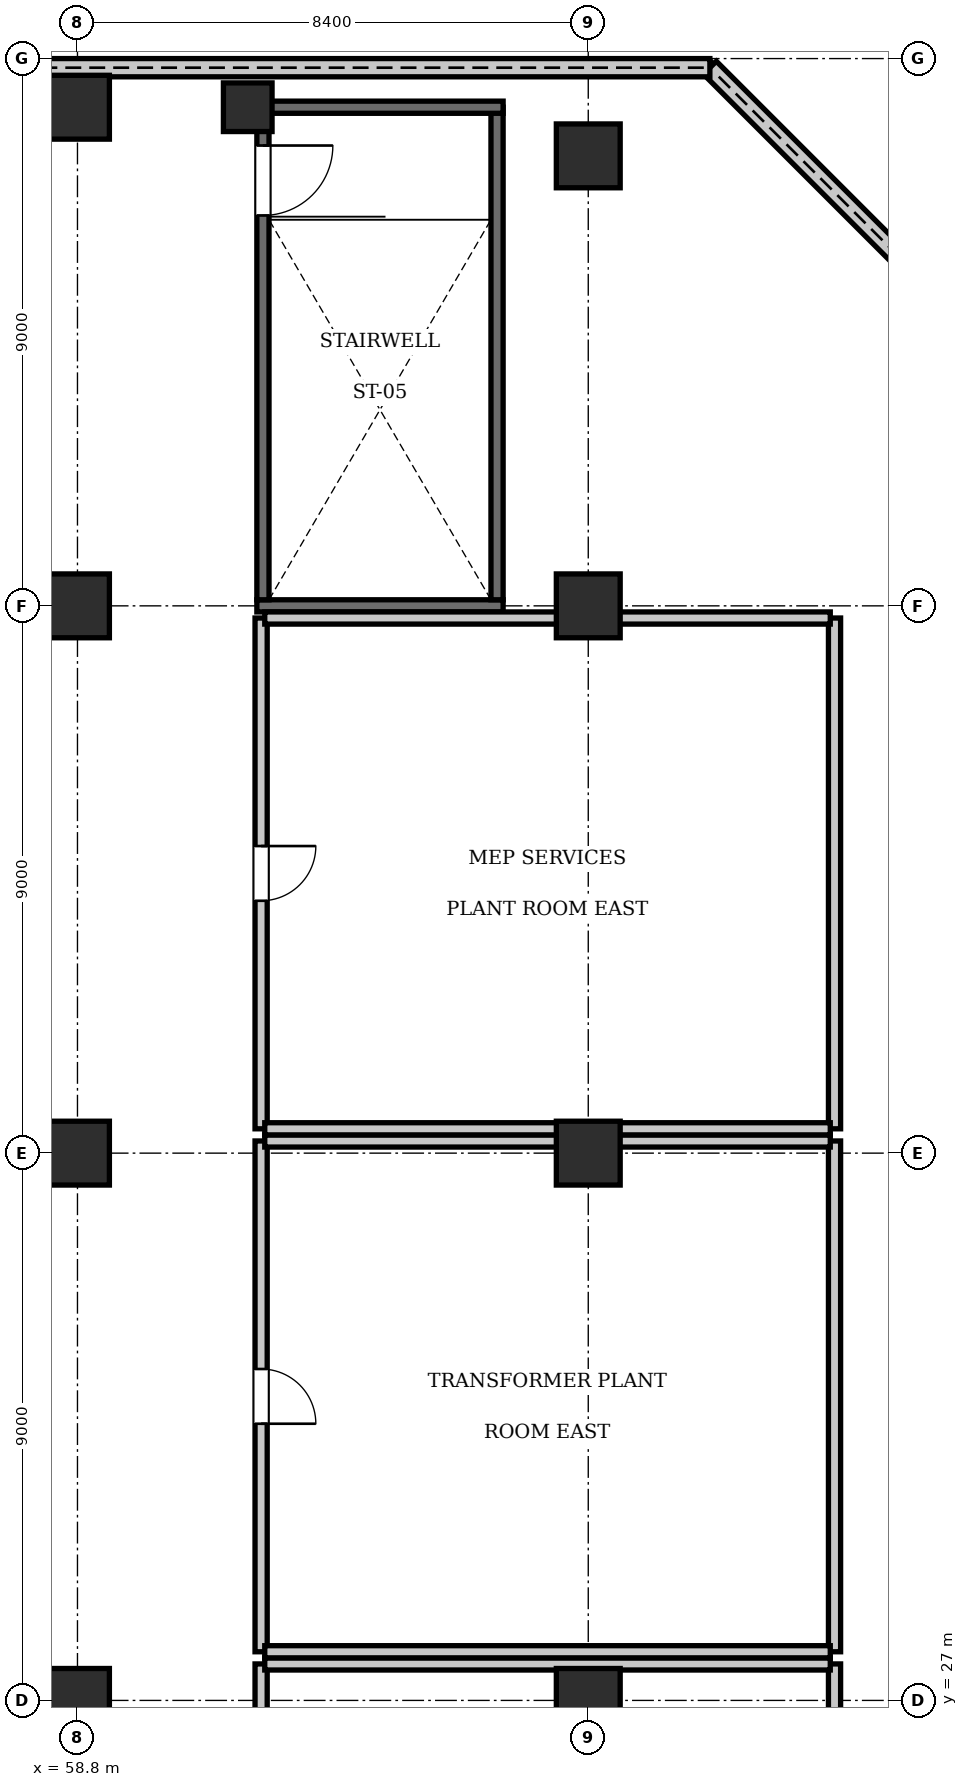
"""IFC4 building model, lengths in metres.
Left out: names, types, materials, properties, quantities, classifications, styles, units other than length and angle.
Written with IfcOpenShell. Run it as: python <this file> out.ifc"""

import sys

from ifc_helpers import new_model, si_unit, direction, frame, frame_2d, origin, origin_2d, place, context, subcontext, project, spatial, rectangle, extrude, element, fill, save


model = new_model("IFC4")
c1 = context("Model", 3, precision=1e-05, world=origin(), true_north=direction((0.0, 1.0)))
c2 = subcontext(c1, "Body", "Model", "MODEL_VIEW")
j1 = project(units=[si_unit("LENGTHUNIT", "METRE"), si_unit("PLANEANGLEUNIT", "RADIAN")], contexts=[c1])
p1 = place(None, origin())
s1 = spatial("IfcSite", under=j1, at=p1, CompositionType="ELEMENT")
p2 = place(p1, origin())
s2 = spatial("IfcBuilding", under=s1, at=p2, CompositionType="ELEMENT")
p3 = place(p2, frame((0.0, 0.0, 21.35)))
s3 = spatial("IfcBuildingStorey", under=s2, at=p3, CompositionType="ELEMENT", Elevation=21.35)
for number, where, z_axis, x_axis in (
    (1, (58.8, 27.0, 0.0), (0.0, 0.0, 1.0), (1.0, 0.0, 0.0)),
    (2, (58.8, 36.0, 0.0), (0.0, 0.0, 1.0), (1.0, 0.0, 0.0)),
    (3, (58.8, 45.0, 0.0), (0.0, 0.0, 1.0), (1.0, 0.0, 0.0)),
    (4, (67.2, 27.0, 0.0), (0.0, 0.0, 1.0), (1.0, 0.0, 0.0)),
    (5, (67.2, 36.0, 0.0), (0.0, 0.0, 1.0), (1.0, 0.0, 0.0)),
    (6, (67.2, 45.0, 0.0), (0.0, 0.0, 1.0), (1.0, 0.0, 0.0)),
    (7, (67.2, 52.4, 0.0), (0.0, 0.0, 1.0), (1.0, 0.0, 0.0)),
    (8, (58.8, 53.2, 0.0), (0.0, 0.0, 1.0), (1.0, 0.0, 0.0)),
):
    element("IfcColumn", number, at=place(p3, frame(where, z_axis=z_axis, x_axis=x_axis)), inside=s3, PredefinedType="COLUMN", context=c2, shape_type="SweptSolid", body=[
        extrude(rectangle(XDim=1.05, YDim=1.05, at=origin_2d()), origin(), (0.0, 0.0, 1.0), 5.6),
    ])
p4 = place(p3, frame((61.6, 53.2, 0.0), z_axis=(0.0, 0.0, 1.0), x_axis=(1.0, 0.0, 0.0)))
e9 = element("IfcColumn", 9, at=p4, inside=s3, PredefinedType="PILASTER", context=c2, shape_type="SweptSolid", body=[
    extrude(rectangle(XDim=0.8, YDim=0.8, at=origin_2d()), origin(), (0.0, 0.0, 1.0), 5.6),
])
p5 = place(p3, frame((61.75, 45.0, 0.0), z_axis=(0.0, 0.0, 1.0), x_axis=(1.0, 0.0, 0.0)))
e10 = element("IfcWall", 10, at=p5, inside=s3, PredefinedType="SOLIDWALL", context=c2, shape_type="SweptSolid", body=[
    extrude(rectangle(XDim=4.05, YDim=0.2, at=frame_2d((2.025, 0.0))), origin(), (0.0, 0.0, 1.0), 3.76),
])
p6 = place(p3, frame((61.85, 45.1, 0.0), z_axis=(0.0, 0.0, 1.0), x_axis=(0.0, 1.0, 0.0)))
e11 = element("IfcWall", 11, at=p6, inside=s3, PredefinedType="SOLIDWALL", context=c2, shape_type="SweptSolid", body=[
    extrude(rectangle(XDim=8.1, YDim=0.2, at=frame_2d((4.05, 0.0))), origin(), (0.0, 0.0, 1.0), 5.36),
])
p7 = place(p6, frame((6.32, 0.0, 0.0)))
e12 = element("IfcOpeningElement", 12, at=p7, cuts=e11, PredefinedType="OPENING", context=c2, shape_type="SweptSolid", body=[
    extrude(rectangle(XDim=1.15, YDim=2.15, at=frame_2d((0.575, 1.075))), frame((0.0, 0.11, 0.0), z_axis=(0.0, -1.0, 0.0), x_axis=(1.0, 0.0, 0.0)), (0.0, 0.0, 1.0), 0.22),
])
p8 = place(p3, frame((65.7, 45.1, 0.0), z_axis=(0.0, 0.0, 1.0), x_axis=(0.0, 1.0, 0.0)))
e13 = element("IfcWall", 13, at=p8, inside=s3, PredefinedType="SOLIDWALL", context=c2, shape_type="SweptSolid", body=[
    extrude(rectangle(XDim=8.1, YDim=0.2, at=frame_2d((4.05, 0.0))), origin(), (0.0, 0.0, 1.0), 5.36),
])
p9 = place(p3, frame((61.75, 53.2, 0.0), z_axis=(0.0, 0.0, 1.0), x_axis=(1.0, 0.0, 0.0)))
e14 = element("IfcWall", 14, at=p9, inside=s3, PredefinedType="SOLIDWALL", context=c2, shape_type="SweptSolid", body=[
    extrude(rectangle(XDim=4.05, YDim=0.2, at=frame_2d((2.025, 0.0))), origin(), (0.0, 0.0, 1.0), 5.36),
])
p10 = place(p3, frame((75.45, 47.6, 0.0), z_axis=(0.0, 0.0, 1.0), x_axis=(-0.707106781187, 0.707106781187, 0.0)))
e15 = element("IfcWall", 15, at=p10, inside=s3, PredefinedType="SOLIDWALL", context=c2, shape_type="SweptSolid", body=[
    extrude(rectangle(XDim=8.839, YDim=0.3, at=frame_2d((4.419, 0.0))), origin(), (0.0, 0.0, 1.0), 1.8),
])
p11 = place(p3, frame((69.2, 53.85, 0.0), z_axis=(0.0, 0.0, 1.0), x_axis=(-1.0, 0.0, 0.0)))
e16 = element("IfcWall", 16, at=p11, inside=s3, PredefinedType="SOLIDWALL", context=c2, shape_type="SweptSolid", body=[
    extrude(rectangle(XDim=18.8, YDim=0.3, at=frame_2d((9.4, 0.0))), origin(), (0.0, 0.0, 1.0), 1.8),
])
p12 = place(p3, frame((61.82, 19.2, 0.0), z_axis=(0.0, 0.0, 1.0), x_axis=(0.0, 1.0, 0.0)))
e17 = element("IfcWall", 17, at=p12, inside=s3, PredefinedType="PARTITIONING", context=c2, shape_type="SweptSolid", body=[
    extrude(rectangle(XDim=8.4, YDim=0.2, at=frame_2d((4.2, 0.0))), origin(), (0.0, 0.0, 1.0), 5.36),
])
p13 = place(p12, frame((3.75, 0.0, 0.0)))
e18 = element("IfcOpeningElement", 18, at=p13, cuts=e17, PredefinedType="OPENING", context=c2, shape_type="SweptSolid", body=[
    extrude(rectangle(XDim=0.9, YDim=2.1, at=frame_2d((0.45, 1.05))), frame((0.0, 0.11, 0.0), z_axis=(0.0, -1.0, 0.0), x_axis=(1.0, 0.0, 0.0)), (0.0, 0.0, 1.0), 0.22),
])
p14 = place(p3, frame((71.25, 19.2, 0.0), z_axis=(0.0, 0.0, 1.0), x_axis=(0.0, 1.0, 0.0)))
e19 = element("IfcWall", 19, at=p14, inside=s3, PredefinedType="PARTITIONING", context=c2, shape_type="SweptSolid", body=[
    extrude(rectangle(XDim=8.4, YDim=0.2, at=frame_2d((4.2, 0.0))), origin(), (0.0, 0.0, 1.0), 5.36),
])
p15 = place(p3, frame((61.88, 27.6, 0.0), z_axis=(0.0, 0.0, 1.0), x_axis=(1.0, 0.0, 0.0)))
e20 = element("IfcWall", 20, at=p15, inside=s3, PredefinedType="PARTITIONING", context=c2, shape_type="SweptSolid", body=[
    extrude(rectangle(XDim=9.3, YDim=0.2, at=frame_2d((4.65, 0.0))), origin(), (0.0, 0.0, 1.0), 5.36),
])
p16 = place(p3, frame((61.82, 27.8, 0.0), z_axis=(0.0, 0.0, 1.0), x_axis=(0.0, 1.0, 0.0)))
e21 = element("IfcWall", 21, at=p16, inside=s3, PredefinedType="PARTITIONING", context=c2, shape_type="SweptSolid", body=[
    extrude(rectangle(XDim=8.4, YDim=0.2, at=frame_2d((4.2, 0.0))), origin(), (0.0, 0.0, 1.0), 5.36),
])
p17 = place(p16, frame((3.75, 0.0, 0.0)))
e22 = element("IfcOpeningElement", 22, at=p17, cuts=e21, PredefinedType="OPENING", context=c2, shape_type="SweptSolid", body=[
    extrude(rectangle(XDim=0.9, YDim=2.1, at=frame_2d((0.45, 1.05))), frame((0.0, 0.11, 0.0), z_axis=(0.0, -1.0, 0.0), x_axis=(1.0, 0.0, 0.0)), (0.0, 0.0, 1.0), 0.22),
])
p18 = place(p3, frame((71.25, 27.8, 0.0), z_axis=(0.0, 0.0, 1.0), x_axis=(0.0, 1.0, 0.0)))
e23 = element("IfcWall", 23, at=p18, inside=s3, PredefinedType="PARTITIONING", context=c2, shape_type="SweptSolid", body=[
    extrude(rectangle(XDim=8.4, YDim=0.2, at=frame_2d((4.2, 0.0))), origin(), (0.0, 0.0, 1.0), 5.36),
])
p19 = place(p3, frame((61.88, 27.8, 0.0), z_axis=(0.0, 0.0, 1.0), x_axis=(1.0, 0.0, 0.0)))
e24 = element("IfcWall", 24, at=p19, inside=s3, PredefinedType="PARTITIONING", context=c2, shape_type="SweptSolid", body=[
    extrude(rectangle(XDim=9.3, YDim=0.2, at=frame_2d((4.65, 0.0))), origin(), (0.0, 0.0, 1.0), 5.36),
])
p20 = place(p3, frame((61.88, 36.2, 0.0), z_axis=(0.0, 0.0, 1.0), x_axis=(1.0, 0.0, 0.0)))
e25 = element("IfcWall", 25, at=p20, inside=s3, PredefinedType="PARTITIONING", context=c2, shape_type="SweptSolid", body=[
    extrude(rectangle(XDim=9.3, YDim=0.2, at=frame_2d((4.65, 0.0))), origin(), (0.0, 0.0, 1.0), 3.76),
])
p21 = place(p3, frame((61.82, 36.4, 0.0), z_axis=(0.0, 0.0, 1.0), x_axis=(0.0, 1.0, 0.0)))
e26 = element("IfcWall", 26, at=p21, inside=s3, PredefinedType="PARTITIONING", context=c2, shape_type="SweptSolid", body=[
    extrude(rectangle(XDim=8.4, YDim=0.2, at=frame_2d((4.2, 0.0))), origin(), (0.0, 0.0, 1.0), 5.36),
])
p22 = place(p21, frame((3.75, 0.0, 0.0)))
e27 = element("IfcOpeningElement", 27, at=p22, cuts=e26, PredefinedType="OPENING", context=c2, shape_type="SweptSolid", body=[
    extrude(rectangle(XDim=0.9, YDim=2.1, at=frame_2d((0.45, 1.05))), frame((0.0, 0.11, 0.0), z_axis=(0.0, -1.0, 0.0), x_axis=(1.0, 0.0, 0.0)), (0.0, 0.0, 1.0), 0.22),
])
p23 = place(p3, frame((71.25, 36.4, 0.0), z_axis=(0.0, 0.0, 1.0), x_axis=(0.0, 1.0, 0.0)))
e28 = element("IfcWall", 28, at=p23, inside=s3, PredefinedType="PARTITIONING", context=c2, shape_type="SweptSolid", body=[
    extrude(rectangle(XDim=8.4, YDim=0.2, at=frame_2d((4.2, 0.0))), origin(), (0.0, 0.0, 1.0), 5.36),
])
p24 = place(p3, frame((61.88, 36.4, 0.0), z_axis=(0.0, 0.0, 1.0), x_axis=(1.0, 0.0, 0.0)))
e29 = element("IfcWall", 29, at=p24, inside=s3, PredefinedType="PARTITIONING", context=c2, shape_type="SweptSolid", body=[
    extrude(rectangle(XDim=9.3, YDim=0.2, at=frame_2d((4.65, 0.0))), origin(), (0.0, 0.0, 1.0), 5.36),
])
p25 = place(p3, frame((61.88, 44.8, 0.0), z_axis=(0.0, 0.0, 1.0), x_axis=(1.0, 0.0, 0.0)))
e30 = element("IfcWall", 30, at=p25, inside=s3, PredefinedType="PARTITIONING", context=c2, shape_type="SweptSolid", body=[
    extrude(rectangle(XDim=9.3, YDim=0.2, at=frame_2d((4.65, 0.0))), origin(), (0.0, 0.0, 1.0), 3.76),
])
p26 = place(p7, frame((1.15, 0.0, 0.0), z_axis=(0.0, 0.0, 1.0), x_axis=(-1.0, 0.0, 0.0)))
e31 = element("IfcDoor", 31, at=p26, inside=s3, OperationType="SINGLE_SWING_LEFT", PredefinedType="DOOR", context=c2, shape_type="SweptSolid", body=[
    extrude(rectangle(XDim=1.15, YDim=2.15, at=frame_2d((0.575, 1.075))), frame((0.0, 0.025, 0.0), z_axis=(0.0, -1.0, 0.0), x_axis=(1.0, 0.0, 0.0)), (0.0, 0.0, 1.0), 0.05),
])
fill(e12, e31)
p27 = place(p17, frame((0.9, 0.0, 0.0), z_axis=(0.0, 0.0, 1.0), x_axis=(-1.0, 0.0, 0.0)))
e32 = element("IfcDoor", 32, at=p27, inside=s3, OperationType="SINGLE_SWING_RIGHT", PredefinedType="DOOR", context=c2, shape_type="SweptSolid", body=[
    extrude(rectangle(XDim=0.9, YDim=2.1, at=frame_2d((0.45, 1.05))), frame((0.0, 0.025, 0.0), z_axis=(0.0, -1.0, 0.0), x_axis=(1.0, 0.0, 0.0)), (0.0, 0.0, 1.0), 0.05),
])
fill(e22, e32)
p28 = place(p22, frame((0.9, 0.0, 0.0), z_axis=(0.0, 0.0, 1.0), x_axis=(-1.0, 0.0, 0.0)))
e33 = element("IfcDoor", 33, at=p28, inside=s3, OperationType="SINGLE_SWING_LEFT", PredefinedType="DOOR", context=c2, shape_type="SweptSolid", body=[
    extrude(rectangle(XDim=0.9, YDim=2.1, at=frame_2d((0.45, 1.05))), frame((0.0, 0.025, 0.0), z_axis=(0.0, -1.0, 0.0), x_axis=(1.0, 0.0, 0.0)), (0.0, 0.0, 1.0), 0.05),
])
fill(e27, e33)
save(model, sys.argv[1])
